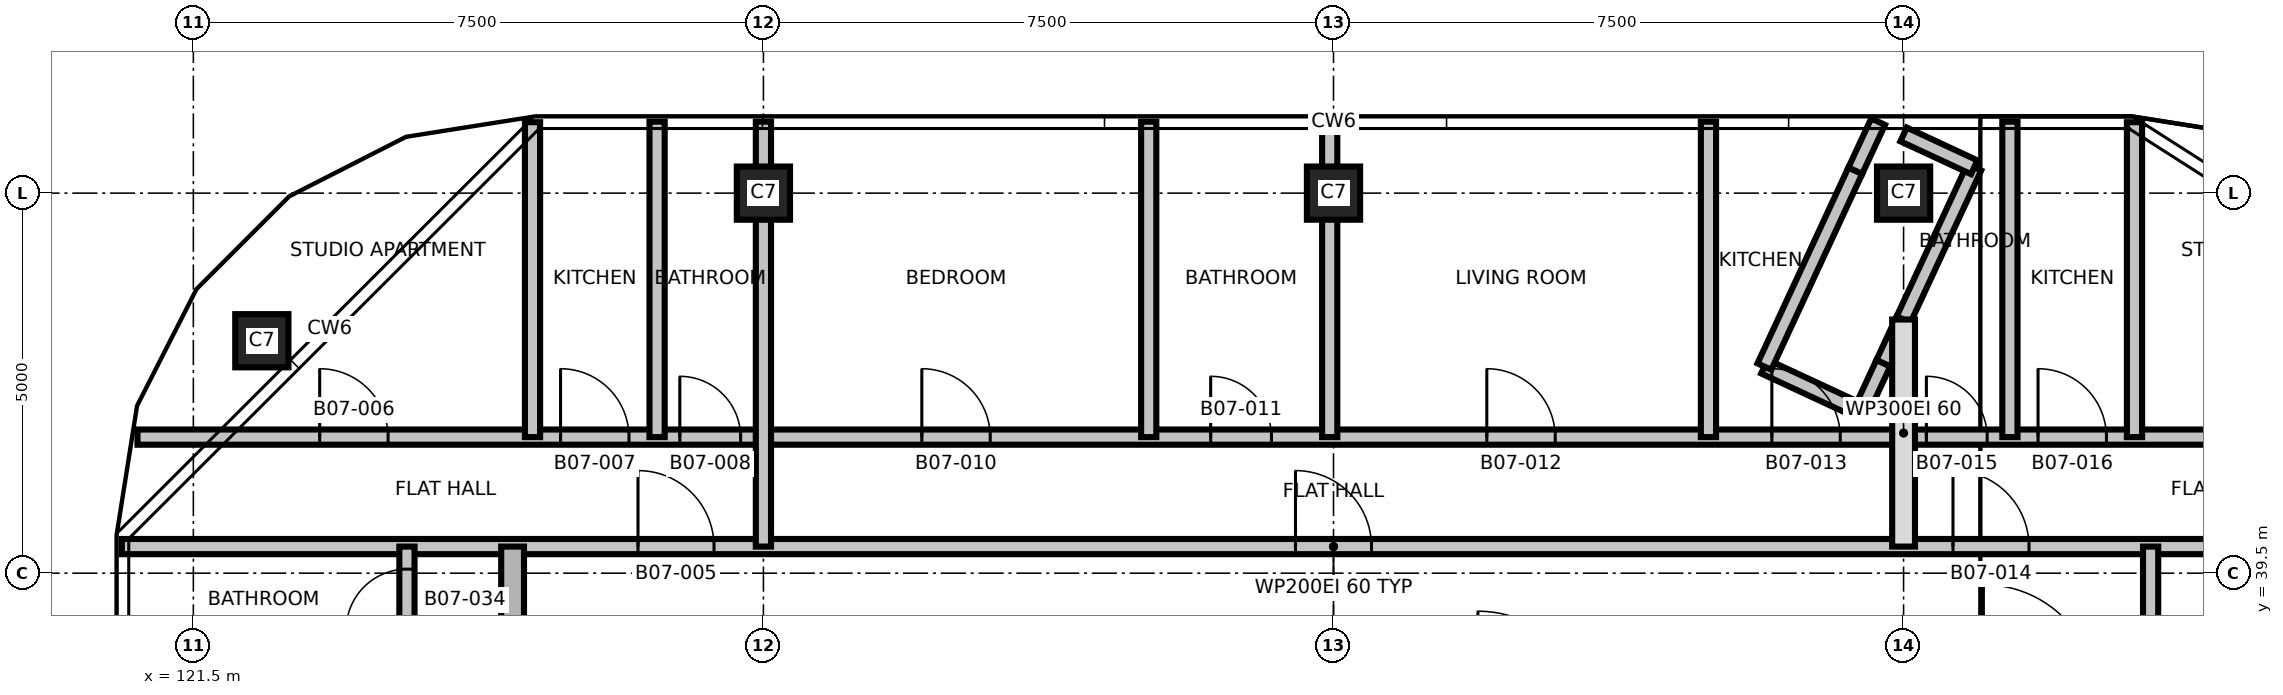
"""IFC4 building model, lengths in metres.
Left out: names, types, materials, properties, quantities, classifications, styles, units other than length and angle.
Written with IfcOpenShell. Run it as: python <this file> out.ifc"""

import sys

from ifc_helpers import new_model, si_unit, direction, frame, frame_2d, origin, origin_2d, place, context, subcontext, project, spatial, rectangle, extrude, element, fill, save


model = new_model("IFC4")
c1 = context("Model", 3, precision=1e-05, world=origin(), true_north=direction((0.0, 1.0)))
c2 = subcontext(c1, "Body", "Model", "MODEL_VIEW")
j1 = project(units=[si_unit("LENGTHUNIT", "METRE"), si_unit("PLANEANGLEUNIT", "RADIAN")], contexts=[c1])
p1 = place(None, origin())
s1 = spatial("IfcSite", under=j1, at=p1, CompositionType="ELEMENT")
p2 = place(p1, origin())
s2 = spatial("IfcBuilding", under=s1, at=p2, CompositionType="ELEMENT")
p3 = place(p2, frame((0.0, 0.0, 90.8)))
s3 = spatial("IfcBuildingStorey", under=s2, at=p3, CompositionType="ELEMENT", Elevation=90.8)
for number, where, z_axis, x_axis in (
    (1, (122.401, 42.558, 0.0), (0.0, 0.0, 1.0), (1.0, 0.0, 0.0)),
    (2, (129.0, 44.5, 0.0), (0.0, 0.0, 1.0), (1.0, 0.0, 0.0)),
    (3, (136.5, 44.5, 0.0), (0.0, 0.0, 1.0), (1.0, 0.0, 0.0)),
    (4, (144.0, 44.5, 0.0), (0.0, 0.0, 1.0), (1.0, 0.0, 0.0)),
):
    element("IfcColumn", number, at=place(p3, frame(where, z_axis=z_axis, x_axis=x_axis)), inside=s3, PredefinedType="COLUMN", context=c2, shape_type="SweptSolid", body=[
        extrude(rectangle(XDim=0.7, YDim=0.7, at=origin_2d()), origin(), (0.0, 0.0, 1.0), 3.7),
    ])
p4 = place(p3, frame((142.169, 42.218, 0.0), z_axis=(0.0, 0.0, 1.0), x_axis=(0.906890025327, -0.421367395466, 0.0)))
e5 = element("IfcWall", 5, at=p4, inside=s3, PredefinedType="PARTITIONING", context=c2, shape_type="SweptSolid", body=[
    extrude(rectangle(XDim=1.4, YDim=0.2, at=frame_2d((0.7, 0.0))), origin(), (0.0, 0.0, 1.0), 3.4),
])
p5 = place(p3, frame((142.169, 42.218, 0.0), z_axis=(0.0, 0.0, 1.0), x_axis=(0.421002733132, 0.907059368893, 0.0)))
e6 = element("IfcWall", 6, at=p5, inside=s3, PredefinedType="PARTITIONING", context=c2, shape_type="SweptSolid", body=[
    extrude(rectangle(XDim=2.841, YDim=0.2, at=frame_2d((1.42, 0.0))), origin(), (0.0, 0.0, 1.0), 3.4),
])
p6 = place(p3, frame((143.439, 41.628, 0.0), z_axis=(0.0, 0.0, 1.0), x_axis=(0.421223998033, 0.906956638148, 0.0)))
e7 = element("IfcWall", 7, at=p6, inside=s3, PredefinedType="PARTITIONING", context=c2, shape_type="SweptSolid", body=[
    extrude(rectangle(XDim=0.7, YDim=0.2, at=frame_2d((0.35, 0.0))), origin(), (0.0, 0.0, 1.0), 3.4),
])
p7 = place(p3, frame((143.365, 44.795, 0.0), z_axis=(0.0, 0.0, 1.0), x_axis=(0.421776680367, 0.90669974738, 0.0)))
e8 = element("IfcWall", 8, at=p7, inside=s3, PredefinedType="PARTITIONING", context=c2, shape_type="SweptSolid", body=[
    extrude(rectangle(XDim=0.711, YDim=0.2, at=frame_2d((0.356, 0.0))), origin(), (0.0, 0.0, 1.0), 3.4),
])
p8 = place(p3, frame((143.734, 42.263, 0.0), z_axis=(0.0, 0.0, 1.0), x_axis=(0.420623716183, 0.907235189675, 0.0)))
e9 = element("IfcWall", 9, at=p8, inside=s3, PredefinedType="PARTITIONING", context=c2, shape_type="SweptSolid", body=[
    extrude(rectangle(XDim=0.633, YDim=0.2, at=frame_2d((0.316, 0.0))), origin(), (0.0, 0.0, 1.0), 3.4),
])
p9 = place(p3, frame((144.0, 42.837, 0.0), z_axis=(0.0, 0.0, 1.0), x_axis=(0.421069082826, 0.907028570382, 0.0)))
e10 = element("IfcWall", 10, at=p9, inside=s3, PredefinedType="PARTITIONING", context=c2, shape_type="SweptSolid", body=[
    extrude(rectangle(XDim=2.208, YDim=0.2, at=frame_2d((1.104, 0.0))), origin(), (0.0, 0.0, 1.0), 3.4),
])
p10 = place(p3, frame((144.0, 45.272, 0.0), z_axis=(0.0, 0.0, 1.0), x_axis=(0.906960240365, -0.42121624185, 0.0)))
e11 = element("IfcWall", 11, at=p10, inside=s3, PredefinedType="PARTITIONING", context=c2, shape_type="SweptSolid", body=[
    extrude(rectangle(XDim=1.025, YDim=0.2, at=frame_2d((0.513, 0.0))), origin(), (0.0, 0.0, 1.0), 3.4),
])
p11 = place(p3, frame((120.56, 39.85, 0.0), z_axis=(0.0, 0.0, 1.0), x_axis=(1.0, 0.0, 0.0)))
e12 = element("IfcWall", 12, at=p11, inside=s3, PredefinedType="PARTITIONING", context=c2, shape_type="SweptSolid", body=[
    extrude(rectangle(XDim=31.88, YDim=0.2, at=frame_2d((15.94, 0.0))), origin(), (0.0, 0.0, 1.0), 3.4),
])
p12 = place(p11, frame((6.79, 0.0, 0.0)))
e13 = element("IfcOpeningElement", 13, at=p12, cuts=e12, PredefinedType="OPENING", context=c2, shape_type="SweptSolid", body=[
    extrude(rectangle(XDim=1.0, YDim=2.1, at=frame_2d((0.5, 1.05))), frame((0.0, 0.11, 0.0), z_axis=(0.0, -1.0, 0.0), x_axis=(1.0, 0.0, 0.0)), (0.0, 0.0, 1.0), 0.22),
])
p13 = place(p11, frame((15.44, 0.0, 0.0)))
e14 = element("IfcOpeningElement", 14, at=p13, cuts=e12, PredefinedType="OPENING", context=c2, shape_type="SweptSolid", body=[
    extrude(rectangle(XDim=1.0, YDim=2.1, at=frame_2d((0.5, 1.05))), frame((0.0, 0.11, 0.0), z_axis=(0.0, -1.0, 0.0), x_axis=(1.0, 0.0, 0.0)), (0.0, 0.0, 1.0), 0.22),
])
p14 = place(p11, frame((24.09, 0.0, 0.0)))
e15 = element("IfcOpeningElement", 15, at=p14, cuts=e12, PredefinedType="OPENING", context=c2, shape_type="SweptSolid", body=[
    extrude(rectangle(XDim=1.0, YDim=2.1, at=frame_2d((0.5, 1.05))), frame((0.0, 0.11, 0.0), z_axis=(0.0, -1.0, 0.0), x_axis=(1.0, 0.0, 0.0)), (0.0, 0.0, 1.0), 0.22),
])
p15 = place(p3, frame((120.765, 41.29, 0.0), z_axis=(0.0, 0.0, 1.0), x_axis=(1.0, 0.0, 0.0)))
e16 = element("IfcWall", 16, at=p15, inside=s3, PredefinedType="PARTITIONING", context=c2, shape_type="SweptSolid", body=[
    extrude(rectangle(XDim=31.47, YDim=0.2, at=frame_2d((15.735, 0.0))), origin(), (0.0, 0.0, 1.0), 3.4),
])
p16 = place(p15, frame((2.397, 0.0, 0.0)))
e17 = element("IfcOpeningElement", 17, at=p16, cuts=e16, PredefinedType="OPENING", context=c2, shape_type="SweptSolid", body=[
    extrude(rectangle(XDim=0.9, YDim=2.1, at=frame_2d((0.45, 1.05))), frame((0.0, 0.11, 0.0), z_axis=(0.0, -1.0, 0.0), x_axis=(1.0, 0.0, 0.0)), (0.0, 0.0, 1.0), 0.22),
])
p17 = place(p15, frame((5.566, 0.0, 0.0)))
e18 = element("IfcOpeningElement", 18, at=p17, cuts=e16, PredefinedType="OPENING", context=c2, shape_type="SweptSolid", body=[
    extrude(rectangle(XDim=0.9, YDim=2.1, at=frame_2d((0.45, 1.05))), frame((0.0, 0.11, 0.0), z_axis=(0.0, -1.0, 0.0), x_axis=(1.0, 0.0, 0.0)), (0.0, 0.0, 1.0), 0.22),
])
p18 = place(p15, frame((7.135, 0.0, 0.0)))
e19 = element("IfcOpeningElement", 19, at=p18, cuts=e16, PredefinedType="OPENING", context=c2, shape_type="SweptSolid", body=[
    extrude(rectangle(XDim=0.8, YDim=2.1, at=frame_2d((0.4, 1.05))), frame((0.0, 0.11, 0.0), z_axis=(0.0, -1.0, 0.0), x_axis=(1.0, 0.0, 0.0)), (0.0, 0.0, 1.0), 0.22),
])
p19 = place(p15, frame((10.319, 0.0, 0.0)))
e20 = element("IfcOpeningElement", 20, at=p19, cuts=e16, PredefinedType="OPENING", context=c2, shape_type="SweptSolid", body=[
    extrude(rectangle(XDim=0.9, YDim=2.1, at=frame_2d((0.45, 1.05))), frame((0.0, 0.11, 0.0), z_axis=(0.0, -1.0, 0.0), x_axis=(1.0, 0.0, 0.0)), (0.0, 0.0, 1.0), 0.22),
])
p20 = place(p15, frame((14.119, 0.0, 0.0)))
e21 = element("IfcOpeningElement", 21, at=p20, cuts=e16, PredefinedType="OPENING", context=c2, shape_type="SweptSolid", body=[
    extrude(rectangle(XDim=0.8, YDim=2.1, at=frame_2d((0.4, 1.05))), frame((0.0, 0.11, 0.0), z_axis=(0.0, -1.0, 0.0), x_axis=(1.0, 0.0, 0.0)), (0.0, 0.0, 1.0), 0.22),
])
p21 = place(p15, frame((17.752, 0.0, 0.0)))
e22 = element("IfcOpeningElement", 22, at=p21, cuts=e16, PredefinedType="OPENING", context=c2, shape_type="SweptSolid", body=[
    extrude(rectangle(XDim=0.9, YDim=2.1, at=frame_2d((0.45, 1.05))), frame((0.0, 0.11, 0.0), z_axis=(0.0, -1.0, 0.0), x_axis=(1.0, 0.0, 0.0)), (0.0, 0.0, 1.0), 0.22),
])
p22 = place(p15, frame((21.502, 0.0, 0.0)))
e23 = element("IfcOpeningElement", 23, at=p22, cuts=e16, PredefinedType="OPENING", context=c2, shape_type="SweptSolid", body=[
    extrude(rectangle(XDim=0.9, YDim=2.1, at=frame_2d((0.45, 1.05))), frame((0.0, 0.11, 0.0), z_axis=(0.0, -1.0, 0.0), x_axis=(1.0, 0.0, 0.0)), (0.0, 0.0, 1.0), 0.22),
])
p23 = place(p15, frame((23.535, 0.0, 0.0)))
e24 = element("IfcOpeningElement", 24, at=p23, cuts=e16, PredefinedType="OPENING", context=c2, shape_type="SweptSolid", body=[
    extrude(rectangle(XDim=0.8, YDim=2.1, at=frame_2d((0.4, 1.05))), frame((0.0, 0.11, 0.0), z_axis=(0.0, -1.0, 0.0), x_axis=(1.0, 0.0, 0.0)), (0.0, 0.0, 1.0), 0.22),
])
p24 = place(p15, frame((25.004, 0.0, 0.0)))
e25 = element("IfcOpeningElement", 25, at=p24, cuts=e16, PredefinedType="OPENING", context=c2, shape_type="SweptSolid", body=[
    extrude(rectangle(XDim=0.9, YDim=2.1, at=frame_2d((0.45, 1.05))), frame((0.0, 0.11, 0.0), z_axis=(0.0, -1.0, 0.0), x_axis=(1.0, 0.0, 0.0)), (0.0, 0.0, 1.0), 0.22),
])
p25 = place(p15, frame((28.173, 0.0, 0.0)))
e26 = element("IfcOpeningElement", 26, at=p25, cuts=e16, PredefinedType="OPENING", context=c2, shape_type="SweptSolid", body=[
    extrude(rectangle(XDim=0.9, YDim=2.1, at=frame_2d((0.45, 1.05))), frame((0.0, 0.11, 0.0), z_axis=(0.0, -1.0, 0.0), x_axis=(1.0, 0.0, 0.0)), (0.0, 0.0, 1.0), 0.22),
])
p26 = place(p3, frame((124.31, 22.15, 0.0), z_axis=(0.0, 0.0, 1.0), x_axis=(0.0, 1.0, 0.0)))
e27 = element("IfcWall", 27, at=p26, inside=s3, PredefinedType="PARTITIONING", context=c2, shape_type="SweptSolid", body=[
    extrude(rectangle(XDim=17.7, YDim=0.2, at=frame_2d((8.85, 0.0))), origin(), (0.0, 0.0, 1.0), 3.4),
])
p27 = place(p26, frame((1.725, 0.0, 0.0)))
e28 = element("IfcOpeningElement", 28, at=p27, cuts=e27, PredefinedType="OPENING", context=c2, shape_type="SweptSolid", body=[
    extrude(rectangle(XDim=0.9, YDim=2.1, at=frame_2d((0.45, 1.05))), frame((0.0, 0.11, 0.0), z_axis=(0.0, -1.0, 0.0), x_axis=(1.0, 0.0, 0.0)), (0.0, 0.0, 1.0), 0.22),
])
p28 = place(p26, frame((6.867, 0.0, 0.0)))
e29 = element("IfcOpeningElement", 29, at=p28, cuts=e27, PredefinedType="OPENING", context=c2, shape_type="SweptSolid", body=[
    extrude(rectangle(XDim=0.9, YDim=2.1, at=frame_2d((0.45, 1.05))), frame((0.0, 0.11, 0.0), z_axis=(0.0, -1.0, 0.0), x_axis=(1.0, 0.0, 0.0)), (0.0, 0.0, 1.0), 0.22),
])
p29 = place(p26, frame((11.367, 0.0, 0.0)))
e30 = element("IfcOpeningElement", 30, at=p29, cuts=e27, PredefinedType="OPENING", context=c2, shape_type="SweptSolid", body=[
    extrude(rectangle(XDim=0.9, YDim=2.1, at=frame_2d((0.45, 1.05))), frame((0.0, 0.11, 0.0), z_axis=(0.0, -1.0, 0.0), x_axis=(1.0, 0.0, 0.0)), (0.0, 0.0, 1.0), 0.22),
])
p30 = place(p26, frame((14.378, 0.0, 0.0)))
e31 = element("IfcOpeningElement", 31, at=p30, cuts=e27, PredefinedType="OPENING", context=c2, shape_type="SweptSolid", body=[
    extrude(rectangle(XDim=0.9, YDim=2.1, at=frame_2d((0.45, 1.05))), frame((0.0, 0.11, 0.0), z_axis=(0.0, -1.0, 0.0), x_axis=(1.0, 0.0, 0.0)), (0.0, 0.0, 1.0), 0.22),
])
p31 = place(p26, frame((16.603, 0.0, 0.0)))
e32 = element("IfcOpeningElement", 32, at=p31, cuts=e27, PredefinedType="OPENING", context=c2, shape_type="SweptSolid", body=[
    extrude(rectangle(XDim=0.8, YDim=2.1, at=frame_2d((0.4, 1.05))), frame((0.0, 0.11, 0.0), z_axis=(0.0, -1.0, 0.0), x_axis=(1.0, 0.0, 0.0)), (0.0, 0.0, 1.0), 0.22),
])
p32 = place(p3, frame((125.7, 22.15, 0.0), z_axis=(0.0, 0.0, 1.0), x_axis=(0.0, 1.0, 0.0)))
e33 = element("IfcWall", 33, at=p32, inside=s3, PredefinedType="SHEAR", context=c2, shape_type="SweptSolid", body=[
    extrude(rectangle(XDim=17.7, YDim=0.3, at=frame_2d((8.85, 0.0))), origin(), (0.0, 0.0, 1.0), 3.4),
])
p33 = place(p32, frame((2.7, 0.0, 0.0)))
e34 = element("IfcOpeningElement", 34, at=p33, cuts=e33, PredefinedType="OPENING", context=c2, shape_type="SweptSolid", body=[
    extrude(rectangle(XDim=1.0, YDim=2.1, at=frame_2d((0.5, 1.05))), frame((0.0, 0.16, 0.0), z_axis=(0.0, -1.0, 0.0), x_axis=(1.0, 0.0, 0.0)), (0.0, 0.0, 1.0), 0.32),
])
p34 = place(p3, frame((125.962, 41.29, 0.0), z_axis=(0.0, 0.0, 1.0), x_axis=(0.0, 1.0, 0.0)))
e35 = element("IfcWall", 35, at=p34, inside=s3, PredefinedType="PARTITIONING", context=c2, shape_type="SweptSolid", body=[
    extrude(rectangle(XDim=4.143, YDim=0.2, at=frame_2d((2.072, 0.0))), origin(), (0.0, 0.0, 1.0), 3.4),
])
p35 = place(p3, frame((127.601, 41.29, 0.0), z_axis=(0.0, 0.0, 1.0), x_axis=(0.0, 1.0, 0.0)))
e36 = element("IfcWall", 36, at=p35, inside=s3, PredefinedType="PARTITIONING", context=c2, shape_type="SweptSolid", body=[
    extrude(rectangle(XDim=4.15, YDim=0.2, at=frame_2d((2.075, 0.0))), origin(), (0.0, 0.0, 1.0), 3.4),
])
p36 = place(p3, frame((129.0, 39.85, 0.0), z_axis=(0.0, 0.0, 1.0), x_axis=(0.0, 1.0, 0.0)))
e37 = element("IfcWall", 37, at=p36, inside=s3, PredefinedType="PARTITIONING", context=c2, shape_type="SweptSolid", body=[
    extrude(rectangle(XDim=5.59, YDim=0.2, at=frame_2d((2.795, 0.0))), origin(), (0.0, 0.0, 1.0), 3.4),
])
for number, where, z_axis, x_axis in (
    (38, (134.069, 41.29, 0.0), (0.0, 0.0, 1.0), (0.0, 1.0, 0.0)),
    (39, (136.45, 41.29, 0.0), (0.0, 0.0, 1.0), (0.0, 1.0, 0.0)),
    (40, (141.433, 41.29, 0.0), (0.0, 0.0, 1.0), (0.0, 1.0, 0.0)),
):
    element("IfcWall", number, at=place(p3, frame(where, z_axis=z_axis, x_axis=x_axis)), inside=s3, PredefinedType="PARTITIONING", context=c2, shape_type="SweptSolid", body=[
        extrude(rectangle(XDim=4.15, YDim=0.2, at=frame_2d((2.075, 0.0))), origin(), (0.0, 0.0, 1.0), 3.4),
    ])
p37 = place(p3, frame((144.0, 39.85, 0.0), z_axis=(0.0, 0.0, 1.0), x_axis=(0.0, 1.0, 0.0)))
e41 = element("IfcWall", 41, at=p37, inside=s3, PredefinedType="PARTITIONING", context=c2, shape_type="SweptSolid", body=[
    extrude(rectangle(XDim=2.987, YDim=0.3, at=frame_2d((1.493, 0.0))), origin(), (0.0, 0.0, 1.0), 3.4),
])
p38 = place(p3, frame((145.399, 41.29, 0.0), z_axis=(0.0, 0.0, 1.0), x_axis=(0.0, 1.0, 0.0)))
e42 = element("IfcWall", 42, at=p38, inside=s3, PredefinedType="PARTITIONING", context=c2, shape_type="SweptSolid", body=[
    extrude(rectangle(XDim=4.15, YDim=0.2, at=frame_2d((2.075, 0.0))), origin(), (0.0, 0.0, 1.0), 3.4),
])
p39 = place(p3, frame((147.038, 41.29, 0.0), z_axis=(0.0, 0.0, 1.0), x_axis=(0.0, 1.0, 0.0)))
e43 = element("IfcWall", 43, at=p39, inside=s3, PredefinedType="PARTITIONING", context=c2, shape_type="SweptSolid", body=[
    extrude(rectangle(XDim=4.143, YDim=0.2, at=frame_2d((2.072, 0.0))), origin(), (0.0, 0.0, 1.0), 3.4),
])
p40 = place(p3, frame((147.25, 22.15, 0.0), z_axis=(0.0, 0.0, 1.0), x_axis=(0.0, 1.0, 0.0)))
e44 = element("IfcWall", 44, at=p40, inside=s3, PredefinedType="PARTITIONING", context=c2, shape_type="SweptSolid", body=[
    extrude(rectangle(XDim=17.7, YDim=0.2, at=frame_2d((8.85, 0.0))), origin(), (0.0, 0.0, 1.0), 3.4),
])
p41 = place(p40, frame((2.65, 0.0, 0.0)))
e45 = element("IfcOpeningElement", 45, at=p41, cuts=e44, PredefinedType="OPENING", context=c2, shape_type="SweptSolid", body=[
    extrude(rectangle(XDim=1.0, YDim=2.1, at=frame_2d((0.5, 1.05))), frame((0.0, 0.11, 0.0), z_axis=(0.0, -1.0, 0.0), x_axis=(1.0, 0.0, 0.0)), (0.0, 0.0, 1.0), 0.22),
])
p42 = place(p12, origin())
e46 = element("IfcDoor", 46, at=p42, inside=s3, OperationType="SINGLE_SWING_LEFT", PredefinedType="DOOR", context=c2, shape_type="SweptSolid", body=[
    extrude(rectangle(XDim=1.0, YDim=2.1, at=frame_2d((0.5, 1.05))), frame((0.0, 0.025, 0.0), z_axis=(0.0, -1.0, 0.0), x_axis=(1.0, 0.0, 0.0)), (0.0, 0.0, 1.0), 0.05),
])
fill(e13, e46)
p43 = place(p16, origin())
e47 = element("IfcDoor", 47, at=p43, inside=s3, OperationType="SINGLE_SWING_RIGHT", PredefinedType="DOOR", context=c2, shape_type="SweptSolid", body=[
    extrude(rectangle(XDim=0.9, YDim=2.1, at=frame_2d((0.45, 1.05))), frame((0.0, 0.025, 0.0), z_axis=(0.0, -1.0, 0.0), x_axis=(1.0, 0.0, 0.0)), (0.0, 0.0, 1.0), 0.05),
])
fill(e17, e47)
p44 = place(p17, origin())
e48 = element("IfcDoor", 48, at=p44, inside=s3, OperationType="SINGLE_SWING_LEFT", PredefinedType="DOOR", context=c2, shape_type="SweptSolid", body=[
    extrude(rectangle(XDim=0.9, YDim=2.1, at=frame_2d((0.45, 1.05))), frame((0.0, 0.025, 0.0), z_axis=(0.0, -1.0, 0.0), x_axis=(1.0, 0.0, 0.0)), (0.0, 0.0, 1.0), 0.05),
])
fill(e18, e48)
p45 = place(p18, origin())
e49 = element("IfcDoor", 49, at=p45, inside=s3, OperationType="SINGLE_SWING_RIGHT", PredefinedType="DOOR", context=c2, shape_type="SweptSolid", body=[
    extrude(rectangle(XDim=0.8, YDim=2.1, at=frame_2d((0.4, 1.05))), frame((0.0, 0.025, 0.0), z_axis=(0.0, -1.0, 0.0), x_axis=(1.0, 0.0, 0.0)), (0.0, 0.0, 1.0), 0.05),
])
fill(e19, e49)
p46 = place(p13, origin())
e50 = element("IfcDoor", 50, at=p46, inside=s3, OperationType="SINGLE_SWING_LEFT", PredefinedType="DOOR", context=c2, shape_type="SweptSolid", body=[
    extrude(rectangle(XDim=1.0, YDim=2.1, at=frame_2d((0.5, 1.05))), frame((0.0, 0.025, 0.0), z_axis=(0.0, -1.0, 0.0), x_axis=(1.0, 0.0, 0.0)), (0.0, 0.0, 1.0), 0.05),
])
fill(e14, e50)
p47 = place(p19, origin())
e51 = element("IfcDoor", 51, at=p47, inside=s3, OperationType="SINGLE_SWING_RIGHT", PredefinedType="DOOR", context=c2, shape_type="SweptSolid", body=[
    extrude(rectangle(XDim=0.9, YDim=2.1, at=frame_2d((0.45, 1.05))), frame((0.0, 0.025, 0.0), z_axis=(0.0, -1.0, 0.0), x_axis=(1.0, 0.0, 0.0)), (0.0, 0.0, 1.0), 0.05),
])
fill(e20, e51)
p48 = place(p20, origin())
e52 = element("IfcDoor", 52, at=p48, inside=s3, OperationType="SINGLE_SWING_LEFT", PredefinedType="DOOR", context=c2, shape_type="SweptSolid", body=[
    extrude(rectangle(XDim=0.8, YDim=2.1, at=frame_2d((0.4, 1.05))), frame((0.0, 0.025, 0.0), z_axis=(0.0, -1.0, 0.0), x_axis=(1.0, 0.0, 0.0)), (0.0, 0.0, 1.0), 0.05),
])
fill(e21, e52)
p49 = place(p21, origin())
e53 = element("IfcDoor", 53, at=p49, inside=s3, OperationType="SINGLE_SWING_RIGHT", PredefinedType="DOOR", context=c2, shape_type="SweptSolid", body=[
    extrude(rectangle(XDim=0.9, YDim=2.1, at=frame_2d((0.45, 1.05))), frame((0.0, 0.025, 0.0), z_axis=(0.0, -1.0, 0.0), x_axis=(1.0, 0.0, 0.0)), (0.0, 0.0, 1.0), 0.05),
])
fill(e22, e53)
p50 = place(p22, origin())
e54 = element("IfcDoor", 54, at=p50, inside=s3, OperationType="SINGLE_SWING_LEFT", PredefinedType="DOOR", context=c2, shape_type="SweptSolid", body=[
    extrude(rectangle(XDim=0.9, YDim=2.1, at=frame_2d((0.45, 1.05))), frame((0.0, 0.025, 0.0), z_axis=(0.0, -1.0, 0.0), x_axis=(1.0, 0.0, 0.0)), (0.0, 0.0, 1.0), 0.05),
])
fill(e23, e54)
p51 = place(p14, origin())
e55 = element("IfcDoor", 55, at=p51, inside=s3, OperationType="SINGLE_SWING_RIGHT", PredefinedType="DOOR", context=c2, shape_type="SweptSolid", body=[
    extrude(rectangle(XDim=1.0, YDim=2.1, at=frame_2d((0.5, 1.05))), frame((0.0, 0.025, 0.0), z_axis=(0.0, -1.0, 0.0), x_axis=(1.0, 0.0, 0.0)), (0.0, 0.0, 1.0), 0.05),
])
fill(e15, e55)
p52 = place(p23, origin())
e56 = element("IfcDoor", 56, at=p52, inside=s3, OperationType="SINGLE_SWING_LEFT", PredefinedType="DOOR", context=c2, shape_type="SweptSolid", body=[
    extrude(rectangle(XDim=0.8, YDim=2.1, at=frame_2d((0.4, 1.05))), frame((0.0, 0.025, 0.0), z_axis=(0.0, -1.0, 0.0), x_axis=(1.0, 0.0, 0.0)), (0.0, 0.0, 1.0), 0.05),
])
fill(e24, e56)
p53 = place(p24, origin())
e57 = element("IfcDoor", 57, at=p53, inside=s3, OperationType="SINGLE_SWING_RIGHT", PredefinedType="DOOR", context=c2, shape_type="SweptSolid", body=[
    extrude(rectangle(XDim=0.9, YDim=2.1, at=frame_2d((0.45, 1.05))), frame((0.0, 0.025, 0.0), z_axis=(0.0, -1.0, 0.0), x_axis=(1.0, 0.0, 0.0)), (0.0, 0.0, 1.0), 0.05),
])
fill(e25, e57)
p54 = place(p31, origin())
e58 = element("IfcDoor", 58, at=p54, inside=s3, OperationType="SINGLE_SWING_RIGHT", PredefinedType="DOOR", context=c2, shape_type="SweptSolid", body=[
    extrude(rectangle(XDim=0.8, YDim=2.1, at=frame_2d((0.4, 1.05))), frame((0.0, 0.025, 0.0), z_axis=(0.0, -1.0, 0.0), x_axis=(1.0, 0.0, 0.0)), (0.0, 0.0, 1.0), 0.05),
])
fill(e32, e58)
save(model, sys.argv[1])
